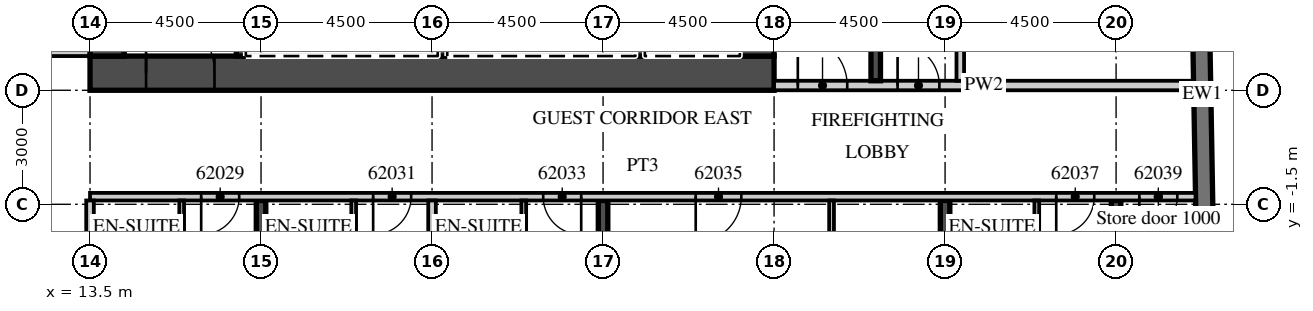
"""IFC4 building model, lengths in metres.
Left out: names, types, materials, properties, quantities, classifications, styles, units other than length and angle.
Written with IfcOpenShell. Run it as: python <this file> out.ifc"""

import sys

from ifc_helpers import new_model, si_unit, direction, frame, frame_2d, origin, place, context, subcontext, project, spatial, rectangle, extrude, element, fill, save


model = new_model("IFC4")
c1 = context("Model", 3, precision=1e-05, world=origin(), true_north=direction((0.0, 1.0)))
c2 = subcontext(c1, "Body", "Model", "MODEL_VIEW")
j1 = project(units=[si_unit("LENGTHUNIT", "METRE"), si_unit("PLANEANGLEUNIT", "RADIAN")], contexts=[c1])
p1 = place(None, origin())
s1 = spatial("IfcSite", under=j1, at=p1, CompositionType="ELEMENT")
p2 = place(p1, origin())
s2 = spatial("IfcBuilding", under=s1, at=p2, CompositionType="ELEMENT")
p3 = place(p2, frame((0.0, 0.0, 250.7)))
s3 = spatial("IfcBuildingStorey", under=s2, at=p3, CompositionType="ELEMENT", Elevation=250.7)
p4 = place(p3, frame((18.0, -19.079, 0.0), z_axis=(0.0, 0.0, 1.0), x_axis=(0.0, 1.0, 0.0)))
e1 = element("IfcWall", 1, at=p4, inside=s3, PredefinedType="SHEAR", context=c2, shape_type="SweptSolid", body=[
    extrude(rectangle(XDim=17.679, YDim=0.25, at=frame_2d((8.84, 0.0))), origin(), (0.0, 0.0, 1.0), 3.3),
])
p5 = place(p3, frame((27.0, -18.922, 0.0), z_axis=(0.0, 0.0, 1.0), x_axis=(0.0, 1.0, 0.0)))
e2 = element("IfcWall", 2, at=p5, inside=s3, PredefinedType="SHEAR", context=c2, shape_type="SweptSolid", body=[
    extrude(rectangle(XDim=17.522, YDim=0.25, at=frame_2d((8.761, 0.0))), origin(), (0.0, 0.0, 1.0), 3.3),
])
p6 = place(p3, frame((36.0, -18.765, 0.0), z_axis=(0.0, 0.0, 1.0), x_axis=(0.0, 1.0, 0.0)))
e3 = element("IfcWall", 3, at=p6, inside=s3, PredefinedType="SHEAR", context=c2, shape_type="SweptSolid", body=[
    extrude(rectangle(XDim=17.365, YDim=0.25, at=frame_2d((8.683, 0.0))), origin(), (0.0, 0.0, 1.0), 3.3),
])
p7 = place(p3, frame((40.5, -18.325, 0.0), z_axis=(0.0, 0.0, 1.0), x_axis=(0.0, 1.0, 0.0)))
e4 = element("IfcWall", 4, at=p7, inside=s3, PredefinedType="SHEAR", context=c2, shape_type="SweptSolid", body=[
    extrude(rectangle(XDim=16.925, YDim=0.25, at=frame_2d((8.463, 0.0))), origin(), (0.0, 0.0, 1.0), 3.3),
])
p8 = place(p3, frame((43.057, -15.103, 0.0), z_axis=(0.0, 0.0, 1.0), x_axis=(-0.017452408953, 0.999847695112, 0.0)))
e5 = element("IfcWall", 5, at=p8, inside=s3, PredefinedType="SOLIDWALL", context=c2, shape_type="SweptSolid", body=[
    extrude(rectangle(XDim=33.0, YDim=0.45, at=frame_2d((16.5, 0.0))), origin(), (0.0, 0.0, 1.0), 3.02),
])
p9 = place(p3, frame((-13.5, 2.5, 0.0), z_axis=(0.0, 0.0, 1.0), x_axis=(1.0, 0.0, 0.0)))
e6 = element("IfcWall", 6, at=p9, inside=s3, PredefinedType="PARTITIONING", context=c2, shape_type="SweptSolid", body=[
    extrude(rectangle(XDim=27.0, YDim=0.2, at=frame_2d((13.5, 0.0))), origin(), (0.0, 0.0, 1.0), 3.02),
])
p10 = place(p9, frame((0.575, 0.0, 0.0)))
e7 = element("IfcOpeningElement", 7, at=p10, cuts=e6, PredefinedType="OPENING", context=c2, shape_type="SweptSolid", body=[
    extrude(rectangle(XDim=1.0, YDim=2.1, at=frame_2d((0.5, 1.05))), frame((0.0, 0.11, 0.0), z_axis=(0.0, -1.0, 0.0), x_axis=(1.0, 0.0, 0.0)), (0.0, 0.0, 1.0), 0.22),
])
p11 = place(p9, frame((7.45, 0.0, 0.0)))
e8 = element("IfcOpeningElement", 8, at=p11, cuts=e6, PredefinedType="OPENING", context=c2, shape_type="SweptSolid", body=[
    extrude(rectangle(XDim=1.0, YDim=2.1, at=frame_2d((0.5, 1.05))), frame((0.0, 0.11, 0.0), z_axis=(0.0, -1.0, 0.0), x_axis=(1.0, 0.0, 0.0)), (0.0, 0.0, 1.0), 0.22),
])
p12 = place(p9, frame((11.925, 0.0, 0.0)))
e9 = element("IfcOpeningElement", 9, at=p12, cuts=e6, PredefinedType="OPENING", context=c2, shape_type="SweptSolid", body=[
    extrude(rectangle(XDim=1.0, YDim=2.1, at=frame_2d((0.5, 1.05))), frame((0.0, 0.11, 0.0), z_axis=(0.0, -1.0, 0.0), x_axis=(1.0, 0.0, 0.0)), (0.0, 0.0, 1.0), 0.22),
])
p13 = place(p9, frame((18.862, 0.0, 0.0)))
e10 = element("IfcOpeningElement", 10, at=p13, cuts=e6, PredefinedType="OPENING", context=c2, shape_type="SweptSolid", body=[
    extrude(rectangle(XDim=1.2, YDim=2.1, at=frame_2d((0.6, 1.05))), frame((0.0, 0.11, 0.0), z_axis=(0.0, -1.0, 0.0), x_axis=(1.0, 0.0, 0.0)), (0.0, 0.0, 1.0), 0.22),
])
p14 = place(p9, frame((23.075, 0.0, 0.0)))
e11 = element("IfcOpeningElement", 11, at=p14, cuts=e6, PredefinedType="OPENING", context=c2, shape_type="SweptSolid", body=[
    extrude(rectangle(XDim=1.0, YDim=2.1, at=frame_2d((0.5, 1.05))), frame((0.0, 0.11, 0.0), z_axis=(0.0, -1.0, 0.0), x_axis=(1.0, 0.0, 0.0)), (0.0, 0.0, 1.0), 0.22),
])
p15 = place(p3, frame((13.5, -1.3, 0.0), z_axis=(0.0, 0.0, 1.0), x_axis=(1.0, 0.0, 0.0)))
e12 = element("IfcWall", 12, at=p15, inside=s3, PredefinedType="PARTITIONING", context=c2, shape_type="SweptSolid", body=[
    extrude(rectangle(XDim=29.091, YDim=0.2, at=frame_2d((14.545, 0.0))), origin(), (0.0, 0.0, 1.0), 3.02),
])
p16 = place(p15, frame((2.925, 0.0, 0.0)))
e13 = element("IfcOpeningElement", 13, at=p16, cuts=e12, PredefinedType="OPENING", context=c2, shape_type="SweptSolid", body=[
    extrude(rectangle(XDim=1.0, YDim=2.1, at=frame_2d((0.5, 1.05))), frame((0.0, 0.11, 0.0), z_axis=(0.0, -1.0, 0.0), x_axis=(1.0, 0.0, 0.0)), (0.0, 0.0, 1.0), 0.22),
])
p17 = place(p15, frame((7.45, 0.0, 0.0)))
e14 = element("IfcOpeningElement", 14, at=p17, cuts=e12, PredefinedType="OPENING", context=c2, shape_type="SweptSolid", body=[
    extrude(rectangle(XDim=1.0, YDim=2.1, at=frame_2d((0.5, 1.05))), frame((0.0, 0.11, 0.0), z_axis=(0.0, -1.0, 0.0), x_axis=(1.0, 0.0, 0.0)), (0.0, 0.0, 1.0), 0.22),
])
p18 = place(p15, frame((11.925, 0.0, 0.0)))
e15 = element("IfcOpeningElement", 15, at=p18, cuts=e12, PredefinedType="OPENING", context=c2, shape_type="SweptSolid", body=[
    extrude(rectangle(XDim=1.0, YDim=2.1, at=frame_2d((0.5, 1.05))), frame((0.0, 0.11, 0.0), z_axis=(0.0, -1.0, 0.0), x_axis=(1.0, 0.0, 0.0)), (0.0, 0.0, 1.0), 0.22),
])
p19 = place(p15, frame((15.938, 0.0, 0.0)))
e16 = element("IfcOpeningElement", 16, at=p19, cuts=e12, PredefinedType="OPENING", context=c2, shape_type="SweptSolid", body=[
    extrude(rectangle(XDim=1.2, YDim=2.1, at=frame_2d((0.6, 1.05))), frame((0.0, 0.11, 0.0), z_axis=(0.0, -1.0, 0.0), x_axis=(1.0, 0.0, 0.0)), (0.0, 0.0, 1.0), 0.22),
])
p20 = place(p15, frame((25.425, 0.0, 0.0)))
e17 = element("IfcOpeningElement", 17, at=p20, cuts=e12, PredefinedType="OPENING", context=c2, shape_type="SweptSolid", body=[
    extrude(rectangle(XDim=1.0, YDim=2.1, at=frame_2d((0.5, 1.05))), frame((0.0, 0.11, 0.0), z_axis=(0.0, -1.0, 0.0), x_axis=(1.0, 0.0, 0.0)), (0.0, 0.0, 1.0), 0.22),
])
p21 = place(p15, frame((27.611, 0.0, 0.0)))
e18 = element("IfcOpeningElement", 18, at=p21, cuts=e12, PredefinedType="OPENING", context=c2, shape_type="SweptSolid", body=[
    extrude(rectangle(XDim=1.0, YDim=2.4, at=frame_2d((0.5, 1.2))), frame((0.0, 0.11, 0.0), z_axis=(0.0, -1.0, 0.0), x_axis=(1.0, 0.0, 0.0)), (0.0, 0.0, 1.0), 0.22),
])
p22 = place(p3, frame((13.5, -19.17, 0.0), z_axis=(0.0, 0.0, 1.0), x_axis=(0.0, 1.0, 0.0)))
e19 = element("IfcWall", 19, at=p22, inside=s3, PredefinedType="PARTITIONING", context=c2, shape_type="SweptSolid", body=[
    extrude(rectangle(XDim=17.77, YDim=0.2, at=frame_2d((8.885, 0.0))), origin(), (0.0, 0.0, 1.0), 3.02),
])
p23 = place(p3, frame((15.912, -6.125, 0.0), z_axis=(0.0, 0.0, 1.0), x_axis=(0.0, 1.0, 0.0)))
e20 = element("IfcWall", 20, at=p23, inside=s3, PredefinedType="PARTITIONING", context=c2, shape_type="SweptSolid", body=[
    extrude(rectangle(XDim=4.725, YDim=0.125, at=frame_2d((2.363, 0.0))), origin(), (0.0, 0.0, 1.0), 3.02),
])
p24 = place(p23, frame((1.375, 0.0, 0.0)))
e21 = element("IfcOpeningElement", 21, at=p24, cuts=e20, PredefinedType="OPENING", context=c2, shape_type="SweptSolid", body=[
    extrude(rectangle(XDim=0.9, YDim=2.1, at=frame_2d((0.45, 1.05))), frame((0.0, 0.073, 0.0), z_axis=(0.0, -1.0, 0.0), x_axis=(1.0, 0.0, 0.0)), (0.0, 0.0, 1.0), 0.145),
])
p25 = place(p3, frame((22.5, -19.013, 0.0), z_axis=(0.0, 0.0, 1.0), x_axis=(0.0, 1.0, 0.0)))
e22 = element("IfcWall", 22, at=p25, inside=s3, PredefinedType="PARTITIONING", context=c2, shape_type="SweptSolid", body=[
    extrude(rectangle(XDim=17.613, YDim=0.2, at=frame_2d((8.807, 0.0))), origin(), (0.0, 0.0, 1.0), 3.02),
])
p26 = place(p3, frame((20.438, -6.125, 0.0), z_axis=(0.0, 0.0, 1.0), x_axis=(0.0, 1.0, 0.0)))
e23 = element("IfcWall", 23, at=p26, inside=s3, PredefinedType="PARTITIONING", context=c2, shape_type="SweptSolid", body=[
    extrude(rectangle(XDim=4.725, YDim=0.125, at=frame_2d((2.363, 0.0))), origin(), (0.0, 0.0, 1.0), 3.02),
])
p27 = place(p26, frame((1.375, 0.0, 0.0)))
e24 = element("IfcOpeningElement", 24, at=p27, cuts=e23, PredefinedType="OPENING", context=c2, shape_type="SweptSolid", body=[
    extrude(rectangle(XDim=0.9, YDim=2.1, at=frame_2d((0.45, 1.05))), frame((0.0, 0.073, 0.0), z_axis=(0.0, -1.0, 0.0), x_axis=(1.0, 0.0, 0.0)), (0.0, 0.0, 1.0), 0.145),
])
p28 = place(p3, frame((24.913, -6.125, 0.0), z_axis=(0.0, 0.0, 1.0), x_axis=(0.0, 1.0, 0.0)))
e25 = element("IfcWall", 25, at=p28, inside=s3, PredefinedType="PARTITIONING", context=c2, shape_type="SweptSolid", body=[
    extrude(rectangle(XDim=4.725, YDim=0.125, at=frame_2d((2.363, 0.0))), origin(), (0.0, 0.0, 1.0), 3.02),
])
p29 = place(p28, frame((1.375, 0.0, 0.0)))
e26 = element("IfcOpeningElement", 26, at=p29, cuts=e25, PredefinedType="OPENING", context=c2, shape_type="SweptSolid", body=[
    extrude(rectangle(XDim=0.9, YDim=2.1, at=frame_2d((0.45, 1.05))), frame((0.0, 0.073, 0.0), z_axis=(0.0, -1.0, 0.0), x_axis=(1.0, 0.0, 0.0)), (0.0, 0.0, 1.0), 0.145),
])
p30 = place(p3, frame((33.013, -6.125, 0.0), z_axis=(0.0, 0.0, 1.0), x_axis=(0.0, 1.0, 0.0)))
e27 = element("IfcWall", 27, at=p30, inside=s3, PredefinedType="PARTITIONING", context=c2, shape_type="SweptSolid", body=[
    extrude(rectangle(XDim=4.725, YDim=0.125, at=frame_2d((2.363, 0.0))), origin(), (0.0, 0.0, 1.0), 3.02),
])
p31 = place(p30, frame((1.375, 0.0, 0.0)))
e28 = element("IfcOpeningElement", 28, at=p31, cuts=e27, PredefinedType="OPENING", context=c2, shape_type="SweptSolid", body=[
    extrude(rectangle(XDim=0.9, YDim=2.1, at=frame_2d((0.45, 1.05))), frame((0.0, 0.073, 0.0), z_axis=(0.0, -1.0, 0.0), x_axis=(1.0, 0.0, 0.0)), (0.0, 0.0, 1.0), 0.145),
])
p32 = place(p3, frame((38.413, -6.125, 0.0), z_axis=(0.0, 0.0, 1.0), x_axis=(0.0, 1.0, 0.0)))
e29 = element("IfcWall", 29, at=p32, inside=s3, PredefinedType="PARTITIONING", context=c2, shape_type="SweptSolid", body=[
    extrude(rectangle(XDim=4.725, YDim=0.125, at=frame_2d((2.363, 0.0))), origin(), (0.0, 0.0, 1.0), 3.02),
])
p33 = place(p32, frame((1.375, 0.0, 0.0)))
e30 = element("IfcOpeningElement", 30, at=p33, cuts=e29, PredefinedType="OPENING", context=c2, shape_type="SweptSolid", body=[
    extrude(rectangle(XDim=0.9, YDim=2.1, at=frame_2d((0.45, 1.05))), frame((0.0, 0.073, 0.0), z_axis=(0.0, -1.0, 0.0), x_axis=(1.0, 0.0, 0.0)), (0.0, 0.0, 1.0), 0.145),
])
p34 = place(p3, frame((13.5, 1.95, 0.0), z_axis=(0.0, 0.0, 1.0), x_axis=(1.0, 0.0, 0.0)))
e31 = element("IfcWall", 31, at=p34, inside=s3, PredefinedType="SHEAR", context=c2, shape_type="SweptSolid", body=[
    extrude(rectangle(XDim=18.0, YDim=0.9, at=frame_2d((9.0, 0.0))), origin(), (0.0, 0.0, 1.0), 3.02),
])
p35 = place(p34, frame((1.475, 0.0, 0.0)))
e32 = element("IfcOpeningElement", 32, at=p35, cuts=e31, PredefinedType="OPENING", context=c2, shape_type="SweptSolid", body=[
    extrude(rectangle(XDim=1.8, YDim=2.1, at=frame_2d((0.9, 1.05))), frame((0.0, 0.46, 0.0), z_axis=(0.0, -1.0, 0.0), x_axis=(1.0, 0.0, 0.0)), (0.0, 0.0, 1.0), 0.92),
])
p36 = place(p3, frame((31.05, 2.4, 0.0), z_axis=(0.0, 0.0, 1.0), x_axis=(0.0, 1.0, 0.0)))
e33 = element("IfcWall", 33, at=p36, inside=s3, PredefinedType="SHEAR", context=c2, shape_type="SweptSolid", body=[
    extrude(rectangle(XDim=12.8, YDim=0.9, at=frame_2d((6.4, 0.0))), origin(), (0.0, 0.0, 1.0), 3.02),
])
p37 = place(p36, frame((0.2, 0.0, 0.0)))
e34 = element("IfcOpeningElement", 34, at=p37, cuts=e33, PredefinedType="OPENING", context=c2, shape_type="SweptSolid", body=[
    extrude(rectangle(XDim=1.1, YDim=2.1, at=frame_2d((0.55, 1.05))), frame((0.0, 0.46, 0.0), z_axis=(0.0, -1.0, 0.0), x_axis=(1.0, 0.0, 0.0)), (0.0, 0.0, 1.0), 0.92),
])
p38 = place(p3, frame((13.95, 2.4, 0.0), z_axis=(0.0, 0.0, 1.0), x_axis=(0.0, 1.0, 0.0)))
e35 = element("IfcWall", 35, at=p38, inside=s3, PredefinedType="SHEAR", context=c2, shape_type="SweptSolid", body=[
    extrude(rectangle(XDim=12.2, YDim=0.9, at=frame_2d((6.1, 0.0))), origin(), (0.0, 0.0, 1.0), 3.02),
])
p39 = place(p3, frame((17.475, 2.4, 0.0), z_axis=(0.0, 0.0, 1.0), x_axis=(0.0, 1.0, 0.0)))
e36 = element("IfcWall", 36, at=p39, inside=s3, PredefinedType="SHEAR", context=c2, shape_type="SweptSolid", body=[
    extrude(rectangle(XDim=3.15, YDim=0.25, at=frame_2d((1.575, 0.0))), origin(), (0.0, 0.0, 1.0), 3.02),
])
for number, where, z_axis, x_axis in (
    (37, (27.975, 2.4, 0.0), (0.0, 0.0, 1.0), (0.0, 1.0, 0.0)),
    (38, (22.775, 2.4, 0.0), (0.0, 0.0, 1.0), (0.0, 1.0, 0.0)),
):
    element("IfcWall", number, at=place(p3, frame(where, z_axis=z_axis, x_axis=x_axis)), inside=s3, PredefinedType="SHEAR", context=c2, shape_type="SweptSolid", body=[
        extrude(rectangle(XDim=2.9, YDim=0.25, at=frame_2d((1.45, 0.0))), origin(), (0.0, 0.0, 1.0), 3.02),
    ])
p40 = place(p3, frame((31.5, 1.625, 0.0), z_axis=(0.0, 0.0, 1.0), x_axis=(1.0, 0.0, 0.0)))
e39 = element("IfcWall", 39, at=p40, inside=s3, PredefinedType="PARTITIONING", context=c2, shape_type="SweptSolid", body=[
    extrude(rectangle(XDim=11.04, YDim=0.25, at=frame_2d((5.52, 0.0))), origin(), (0.0, 0.0, 1.0), 3.02),
])
p41 = place(p40, frame((0.625, 0.0, 0.0)))
e40 = element("IfcOpeningElement", 40, at=p41, cuts=e39, PredefinedType="OPENING", context=c2, shape_type="SweptSolid", body=[
    extrude(rectangle(XDim=1.3, YDim=2.1, at=frame_2d((0.65, 1.05))), frame((0.0, 0.135, 0.0), z_axis=(0.0, -1.0, 0.0), x_axis=(1.0, 0.0, 0.0)), (0.0, 0.0, 1.0), 0.27),
])
p42 = place(p40, frame((3.25, 0.0, 0.0)))
e41 = element("IfcOpeningElement", 41, at=p42, cuts=e39, PredefinedType="OPENING", context=c2, shape_type="SweptSolid", body=[
    extrude(rectangle(XDim=1.1, YDim=2.1, at=frame_2d((0.55, 1.05))), frame((0.0, 0.135, 0.0), z_axis=(0.0, -1.0, 0.0), x_axis=(1.0, 0.0, 0.0)), (0.0, 0.0, 1.0), 0.27),
])
p43 = place(p3, frame((34.175, 1.75, 0.0), z_axis=(0.0, 0.0, 1.0), x_axis=(0.0, 1.0, 0.0)))
e42 = element("IfcWall", 42, at=p43, inside=s3, PredefinedType="SHEAR", context=c2, shape_type="SweptSolid", body=[
    extrude(rectangle(XDim=8.35, YDim=0.25, at=frame_2d((4.175, 0.0))), origin(), (0.0, 0.0, 1.0), 3.02),
])
p44 = place(p3, frame((36.4, 1.75, 0.0), z_axis=(0.0, 0.0, 1.0), x_axis=(0.0, 1.0, 0.0)))
e43 = element("IfcWall", 43, at=p44, inside=s3, PredefinedType="PARTITIONING", context=c2, shape_type="SweptSolid", body=[
    extrude(rectangle(XDim=15.95, YDim=0.2, at=frame_2d((7.975, 0.0))), origin(), (0.0, 0.0, 1.0), 3.02),
])
p45 = place(p44, frame((14.7, 0.0, 0.0)))
e44 = element("IfcOpeningElement", 44, at=p45, cuts=e43, PredefinedType="OPENING", context=c2, shape_type="SweptSolid", body=[
    extrude(rectangle(XDim=0.9, YDim=2.1, at=frame_2d((0.45, 1.05))), frame((0.0, 0.11, 0.0), z_axis=(0.0, -1.0, 0.0), x_axis=(1.0, 0.0, 0.0)), (0.0, 0.0, 1.0), 0.22),
])
p46 = place(p16, origin())
e45 = element("IfcDoor", 45, at=p46, inside=s3, OperationType="SINGLE_SWING_LEFT", PredefinedType="DOOR", context=c2, shape_type="SweptSolid", body=[
    extrude(rectangle(XDim=1.0, YDim=2.1, at=frame_2d((0.5, 1.05))), frame((0.0, 0.025, 0.0), z_axis=(0.0, -1.0, 0.0), x_axis=(1.0, 0.0, 0.0)), (0.0, 0.0, 1.0), 0.05),
])
fill(e13, e45)
p47 = place(p17, origin())
e46 = element("IfcDoor", 46, at=p47, inside=s3, OperationType="SINGLE_SWING_LEFT", PredefinedType="DOOR", context=c2, shape_type="SweptSolid", body=[
    extrude(rectangle(XDim=1.0, YDim=2.1, at=frame_2d((0.5, 1.05))), frame((0.0, 0.025, 0.0), z_axis=(0.0, -1.0, 0.0), x_axis=(1.0, 0.0, 0.0)), (0.0, 0.0, 1.0), 0.05),
])
fill(e14, e46)
p48 = place(p18, origin())
e47 = element("IfcDoor", 47, at=p48, inside=s3, OperationType="SINGLE_SWING_RIGHT", PredefinedType="DOOR", context=c2, shape_type="SweptSolid", body=[
    extrude(rectangle(XDim=1.0, YDim=2.1, at=frame_2d((0.5, 1.05))), frame((0.0, 0.025, 0.0), z_axis=(0.0, -1.0, 0.0), x_axis=(1.0, 0.0, 0.0)), (0.0, 0.0, 1.0), 0.05),
])
fill(e15, e47)
p49 = place(p19, origin())
e48 = element("IfcDoor", 48, at=p49, inside=s3, OperationType="SINGLE_SWING_LEFT", PredefinedType="DOOR", context=c2, shape_type="SweptSolid", body=[
    extrude(rectangle(XDim=1.2, YDim=2.1, at=frame_2d((0.6, 1.05))), frame((0.0, 0.025, 0.0), z_axis=(0.0, -1.0, 0.0), x_axis=(1.0, 0.0, 0.0)), (0.0, 0.0, 1.0), 0.05),
])
fill(e16, e48)
p50 = place(p20, origin())
e49 = element("IfcDoor", 49, at=p50, inside=s3, OperationType="SINGLE_SWING_LEFT", PredefinedType="DOOR", context=c2, shape_type="SweptSolid", body=[
    extrude(rectangle(XDim=1.0, YDim=2.1, at=frame_2d((0.5, 1.05))), frame((0.0, 0.025, 0.0), z_axis=(0.0, -1.0, 0.0), x_axis=(1.0, 0.0, 0.0)), (0.0, 0.0, 1.0), 0.05),
])
fill(e17, e49)
p51 = place(p21, origin())
e50 = element("IfcDoor", 50, at=p51, inside=s3, OperationType="SINGLE_SWING_LEFT", PredefinedType="DOOR", context=c2, shape_type="SweptSolid", body=[
    extrude(rectangle(XDim=1.0, YDim=2.4, at=frame_2d((0.5, 1.2))), frame((0.0, 0.025, 0.0), z_axis=(0.0, -1.0, 0.0), x_axis=(1.0, 0.0, 0.0)), (0.0, 0.0, 1.0), 0.05),
])
fill(e18, e50)
p52 = place(p35, origin())
e51 = element("IfcDoor", 51, at=p52, inside=s3, OperationType="DOUBLE_DOOR_DOUBLE_SWING", PredefinedType="DOOR", context=c2, shape_type="SweptSolid", body=[
    extrude(rectangle(XDim=1.8, YDim=2.1, at=frame_2d((0.9, 1.05))), frame((0.0, 0.025, 0.0), z_axis=(0.0, -1.0, 0.0), x_axis=(1.0, 0.0, 0.0)), (0.0, 0.0, 1.0), 0.05),
])
fill(e32, e51)
p53 = place(p41, origin())
e52 = element("IfcDoor", 52, at=p53, inside=s3, OperationType="SINGLE_SWING_LEFT", PredefinedType="DOOR", context=c2, shape_type="SweptSolid", body=[
    extrude(rectangle(XDim=1.3, YDim=2.1, at=frame_2d((0.65, 1.05))), frame((0.0, 0.025, 0.0), z_axis=(0.0, -1.0, 0.0), x_axis=(1.0, 0.0, 0.0)), (0.0, 0.0, 1.0), 0.05),
])
fill(e40, e52)
p54 = place(p42, origin())
e53 = element("IfcDoor", 53, at=p54, inside=s3, OperationType="SINGLE_SWING_LEFT", PredefinedType="DOOR", context=c2, shape_type="SweptSolid", body=[
    extrude(rectangle(XDim=1.1, YDim=2.1, at=frame_2d((0.55, 1.05))), frame((0.0, 0.025, 0.0), z_axis=(0.0, -1.0, 0.0), x_axis=(1.0, 0.0, 0.0)), (0.0, 0.0, 1.0), 0.05),
])
fill(e41, e53)
save(model, sys.argv[1])
